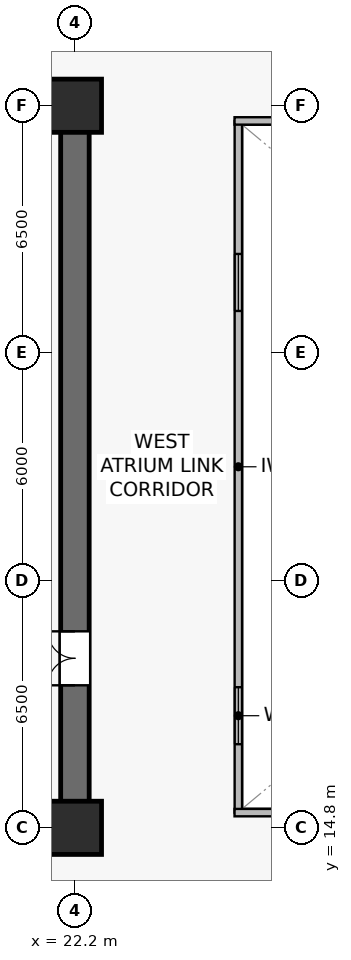
"""IFC4 building model, lengths in metres.
Left out: names, types, materials, properties, quantities, classifications, styles, units other than length and angle.
Written with IfcOpenShell. Run it as: python <this file> out.ifc"""

import sys

from ifc_helpers import new_model, si_unit, direction, frame, frame_2d, origin, origin_2d, place, context, subcontext, project, spatial, rectangle, extrude, source, transform, mapped, element, fill, save


model = new_model("IFC4")
c1 = context("Model", 3, precision=1e-05, world=origin(), true_north=direction((0.0, 1.0)))
c2 = subcontext(c1, "Body", "Model", "MODEL_VIEW")
j1 = project(units=[si_unit("LENGTHUNIT", "METRE"), si_unit("PLANEANGLEUNIT", "RADIAN")], contexts=[c1])
p1 = place(None, origin())
s1 = spatial("IfcSite", under=j1, at=p1, CompositionType="ELEMENT")
p2 = place(p1, origin())
s2 = spatial("IfcBuilding", under=s1, at=p2, CompositionType="ELEMENT")
p3 = place(p2, frame((0.0, 0.0, 49.8)))
s3 = spatial("IfcBuildingStorey", under=s2, at=p3, CompositionType="ELEMENT", Elevation=49.8)
p4 = place(p3, frame((7.025, 14.8, 0.0), z_axis=(0.0, 0.0, 1.0), x_axis=(1.0, 0.0, 0.0)))
e1 = element("IfcWall", 1, at=p4, inside=s3, PredefinedType="SHEAR", context=c2, shape_type="SweptSolid", body=[
    extrude(rectangle(XDim=15.55, YDim=0.75, at=frame_2d((7.775, 0.0))), origin(), (0.0, 0.0, 1.0), 3.78),
])
p5 = place(p3, frame((7.025, 33.8, 0.0), z_axis=(0.0, 0.0, 1.0), x_axis=(1.0, 0.0, 0.0)))
e2 = element("IfcWall", 2, at=p5, inside=s3, PredefinedType="SHEAR", context=c2, shape_type="SweptSolid", body=[
    extrude(rectangle(XDim=15.55, YDim=0.75, at=frame_2d((7.775, 0.0))), origin(), (0.0, 0.0, 1.0), 3.78),
])
p6 = place(p5, frame((5.3, 0.0, 0.0)))
e3 = element("IfcOpeningElement", 3, at=p6, cuts=e2, PredefinedType="OPENING", context=c2, shape_type="SweptSolid", body=[
    extrude(rectangle(XDim=0.95, YDim=2.15, at=frame_2d((0.475, 1.075))), frame((0.0, 0.385, 0.0), z_axis=(0.0, -1.0, 0.0), x_axis=(1.0, 0.0, 0.0)), (0.0, 0.0, 1.0), 0.77),
])
p7 = place(p5, frame((7.815, 0.0, 0.0)))
e4 = element("IfcOpeningElement", 4, at=p7, cuts=e2, PredefinedType="OPENING", context=c2, shape_type="SweptSolid", body=[
    extrude(rectangle(XDim=0.95, YDim=2.15, at=frame_2d((0.475, 1.075))), frame((0.0, 0.385, 0.0), z_axis=(0.0, -1.0, 0.0), x_axis=(1.0, 0.0, 0.0)), (0.0, 0.0, 1.0), 0.77),
])
p8 = place(p5, frame((10.365, 0.0, 0.0)))
e5 = element("IfcOpeningElement", 5, at=p8, cuts=e2, PredefinedType="OPENING", context=c2, shape_type="SweptSolid", body=[
    extrude(rectangle(XDim=0.95, YDim=2.15, at=frame_2d((0.475, 1.075))), frame((0.0, 0.385, 0.0), z_axis=(0.0, -1.0, 0.0), x_axis=(1.0, 0.0, 0.0)), (0.0, 0.0, 1.0), 0.77),
])
p9 = place(p5, frame((12.915, 0.0, 0.0)))
e6 = element("IfcOpeningElement", 6, at=p9, cuts=e2, PredefinedType="OPENING", context=c2, shape_type="SweptSolid", body=[
    extrude(rectangle(XDim=0.95, YDim=2.15, at=frame_2d((0.475, 1.075))), frame((0.0, 0.385, 0.0), z_axis=(0.0, -1.0, 0.0), x_axis=(1.0, 0.0, 0.0)), (0.0, 0.0, 1.0), 0.77),
])
p10 = place(p3, frame((22.2, 15.175, 0.0), z_axis=(0.0, 0.0, 1.0), x_axis=(0.0, 1.0, 0.0)))
e7 = element("IfcWall", 7, at=p10, inside=s3, PredefinedType="SHEAR", context=c2, shape_type="SweptSolid", body=[
    extrude(rectangle(XDim=18.25, YDim=0.75, at=frame_2d((9.125, 0.0))), origin(), (0.0, 0.0, 1.0), 3.78),
])
p11 = place(p10, frame((3.375, 0.0, 0.0)))
e8 = element("IfcOpeningElement", 8, at=p11, cuts=e7, PredefinedType="OPENING", context=c2, shape_type="SweptSolid", body=[
    extrude(rectangle(XDim=1.42, YDim=2.2, at=frame_2d((0.71, 1.1))), frame((0.0, 0.385, 0.0), z_axis=(0.0, -1.0, 0.0), x_axis=(1.0, 0.0, 0.0)), (0.0, 0.0, 1.0), 0.77),
])
m1 = source(origin(), c2, "Body", "SweptSolid", [
    extrude(rectangle(XDim=1.4, YDim=1.4, at=origin_2d()), origin(), (0.0, 0.0, 1.0), 4.1),
])
for number, where, z_axis, x_axis in (
    (9, (22.2, 14.8, 0.0), (0.0, 0.0, 1.0), (1.0, 0.0, 0.0)),
    (10, (22.2, 33.8, 0.0), (0.0, 0.0, 1.0), (1.0, 0.0, 0.0)),
):
    element("IfcColumn", number, at=place(p3, frame(where, z_axis=z_axis, x_axis=x_axis)), inside=s3, PredefinedType="COLUMN", context=c2, shape_type="MappedRepresentation", body=[
        mapped(m1, transform((0.0, 0.0, 0.0), scale=1.0)),
    ])
p12 = place(p3, frame((26.5, 15.2, 0.0), z_axis=(0.0, 0.0, 1.0), x_axis=(0.0, 1.0, 0.0)))
e11 = element("IfcWall", 11, at=p12, inside=s3, PredefinedType="SOLIDWALL", context=c2, shape_type="SweptSolid", body=[
    extrude(rectangle(XDim=18.2, YDim=0.195, at=frame_2d((9.1, 0.0))), origin(), (0.0, 0.0, 1.0), 3.78),
])
p13 = place(p12, frame((1.8, 0.0, 0.9)))
e12 = element("IfcOpeningElement", 12, at=p13, cuts=e11, PredefinedType="OPENING", context=c2, shape_type="SweptSolid", body=[
    extrude(rectangle(XDim=1.5, YDim=1.4, at=frame_2d((0.75, 0.7))), frame((0.0, 0.107, 0.0), z_axis=(0.0, -1.0, 0.0), x_axis=(1.0, 0.0, 0.0)), (0.0, 0.0, 1.0), 0.215),
])
p14 = place(p12, frame((13.2, 0.0, 0.9)))
e13 = element("IfcOpeningElement", 13, at=p14, cuts=e11, PredefinedType="OPENING", context=c2, shape_type="SweptSolid", body=[
    extrude(rectangle(XDim=1.5, YDim=1.4, at=frame_2d((0.75, 0.7))), frame((0.0, 0.107, 0.0), z_axis=(0.0, -1.0, 0.0), x_axis=(1.0, 0.0, 0.0)), (0.0, 0.0, 1.0), 0.215),
])
for number, where, z_axis, x_axis in (
    (14, (26.4, 15.2, 0.0), (0.0, 0.0, 1.0), (1.0, 0.0, 0.0)),
    (15, (26.4, 33.4, 0.0), (0.0, 0.0, 1.0), (1.0, 0.0, 0.0)),
):
    element("IfcWall", number, at=place(p3, frame(where, z_axis=z_axis, x_axis=x_axis)), inside=s3, PredefinedType="SOLIDWALL", context=c2, shape_type="SweptSolid", body=[
        extrude(rectangle(XDim=22.0, YDim=0.195, at=frame_2d((11.0, 0.0))), origin(), (0.0, 0.0, 1.0), 3.78),
    ])
m2 = source(origin(), c2, "Body", "SweptSolid", [
    extrude(rectangle(XDim=1.5, YDim=1.4, at=frame_2d((0.75, 0.7))), frame((0.0, 0.03, 0.0), z_axis=(0.0, -1.0, 0.0), x_axis=(1.0, 0.0, 0.0)), (0.0, 0.0, 1.0), 0.06),
])
p15 = place(p13, origin())
e16 = element("IfcWindow", 16, at=p15, inside=s3, PartitioningType="SINGLE_PANEL", PredefinedType="WINDOW", context=c2, shape_type="MappedRepresentation", body=[
    mapped(m2, transform((0.0, 0.0, 0.0), scale=1.0)),
])
fill(e12, e16)
p16 = place(p14, origin())
e17 = element("IfcWindow", 17, at=p16, inside=s3, PartitioningType="SINGLE_PANEL", PredefinedType="WINDOW", context=c2, shape_type="MappedRepresentation", body=[
    mapped(m2, transform((0.0, 0.0, 0.0), scale=1.0)),
])
fill(e13, e17)
m3 = source(origin(), c2, "Body", "SweptSolid", [
    extrude(rectangle(XDim=1.42, YDim=2.2, at=frame_2d((0.71, 1.1))), frame((0.0, 0.025, 0.0), z_axis=(0.0, -1.0, 0.0), x_axis=(1.0, 0.0, 0.0)), (0.0, 0.0, 1.0), 0.05),
])
p17 = place(p11, origin())
e18 = element("IfcDoor", 18, at=p17, inside=s3, OperationType="DOUBLE_DOOR_SINGLE_SWING", PredefinedType="DOOR", context=c2, shape_type="MappedRepresentation", body=[
    mapped(m3, transform((0.0, 0.0, 0.0), scale=1.0)),
])
fill(e8, e18)
save(model, sys.argv[1])
